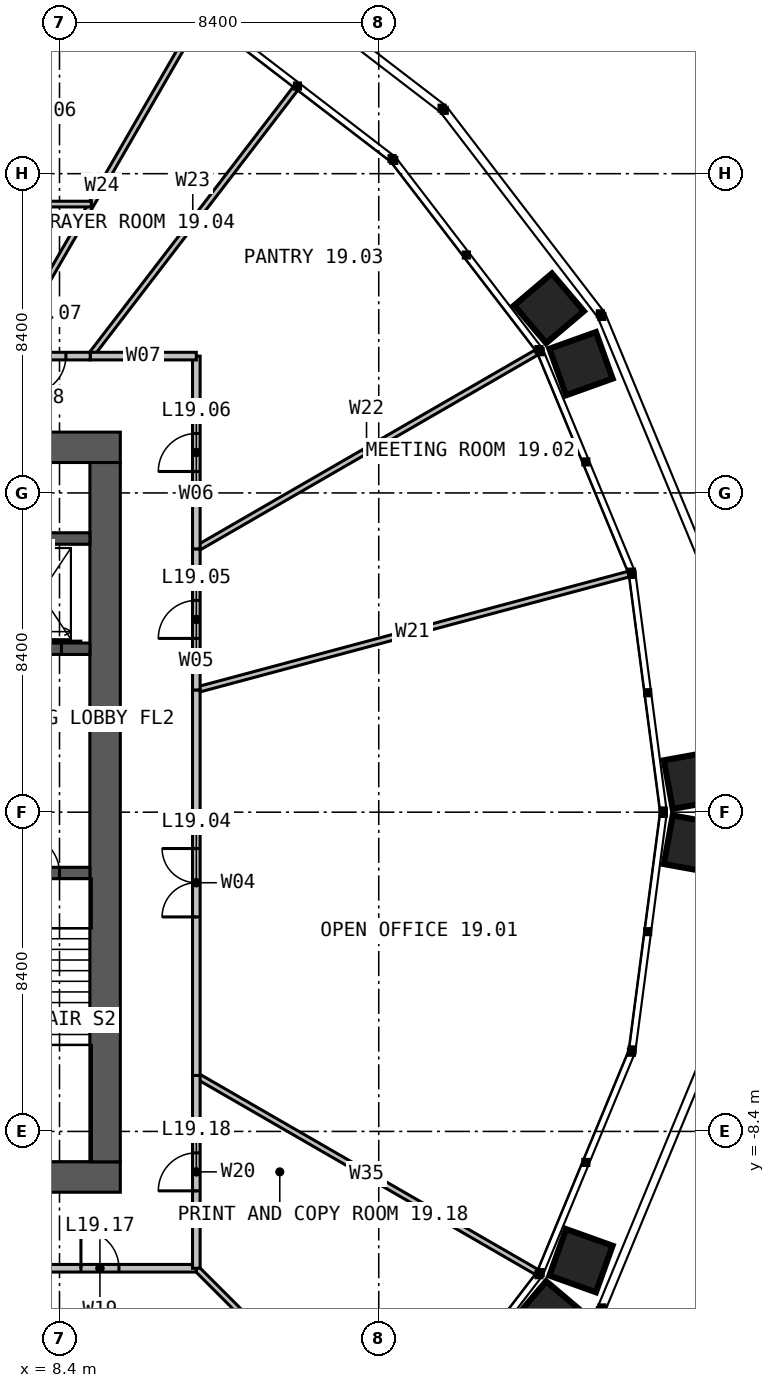
"""IFC4 building model, lengths in metres.
Left out: names, types, materials, properties, quantities, classifications, styles, units other than length and angle.
Written with IfcOpenShell. Run it as: python <this file> out.ifc"""

import sys

from ifc_helpers import new_model, si_unit, direction, frame, frame_2d, origin, place, context, subcontext, project, spatial, rectangle, extrude, element, fill, save


model = new_model("IFC4")
c1 = context("Model", 3, precision=1e-05, world=origin(), true_north=direction((0.0, 1.0)))
c2 = subcontext(c1, "Body", "Model", "MODEL_VIEW")
j1 = project(units=[si_unit("LENGTHUNIT", "METRE"), si_unit("PLANEANGLEUNIT", "RADIAN")], contexts=[c1])
p1 = place(None, origin())
s1 = spatial("IfcSite", under=j1, at=p1, CompositionType="ELEMENT")
p2 = place(p1, origin())
s2 = spatial("IfcBuilding", under=s1, at=p2, CompositionType="ELEMENT")
p3 = place(p2, frame((0.0, 0.0, 81.0)))
s3 = spatial("IfcBuildingStorey", under=s2, at=p3, CompositionType="ELEMENT", Elevation=81.0)
p4 = place(p3, frame((-10.0, 9.6, 0.0), z_axis=(0.0, 0.0, 1.0), x_axis=(1.0, 0.0, 0.0)))
e1 = element("IfcWall", 1, at=p4, inside=s3, PredefinedType="SOLIDWALL", context=c2, shape_type="SweptSolid", body=[
    extrude(rectangle(XDim=20.0, YDim=0.8, at=frame_2d((10.0, 0.0))), origin(), (0.0, 0.0, 1.0), 4.0),
])
p5 = place(p4, frame((9.4, 0.0, 0.0)))
e2 = element("IfcOpeningElement", 2, at=p5, cuts=e1, PredefinedType="OPENING", context=c2, shape_type="SweptSolid", body=[
    extrude(rectangle(XDim=1.2, YDim=2.2, at=frame_2d((0.6, 1.1))), frame((0.0, 0.41, 0.0), z_axis=(0.0, -1.0, 0.0), x_axis=(1.0, 0.0, 0.0)), (0.0, 0.0, 1.0), 0.82),
])
p6 = place(p3, frame((10.0, -9.6, 0.0), z_axis=(0.0, 0.0, 1.0), x_axis=(-1.0, 0.0, 0.0)))
e3 = element("IfcWall", 3, at=p6, inside=s3, PredefinedType="SOLIDWALL", context=c2, shape_type="SweptSolid", body=[
    extrude(rectangle(XDim=20.0, YDim=0.8, at=frame_2d((10.0, 0.0))), origin(), (0.0, 0.0, 1.0), 4.0),
])
p7 = place(p6, frame((6.875, 0.0, 0.0)))
e4 = element("IfcOpeningElement", 4, at=p7, cuts=e3, PredefinedType="OPENING", context=c2, shape_type="SweptSolid", body=[
    extrude(rectangle(XDim=1.2, YDim=2.2, at=frame_2d((0.6, 1.1))), frame((0.0, 0.41, 0.0), z_axis=(0.0, -1.0, 0.0), x_axis=(1.0, 0.0, 0.0)), (0.0, 0.0, 1.0), 0.82),
])
p8 = place(p3, frame((9.6, -9.2, 0.0), z_axis=(0.0, 0.0, 1.0), x_axis=(0.0, 1.0, 0.0)))
e5 = element("IfcWall", 5, at=p8, inside=s3, PredefinedType="SOLIDWALL", context=c2, shape_type="SweptSolid", body=[
    extrude(rectangle(XDim=18.4, YDim=0.8, at=frame_2d((9.2, 0.0))), origin(), (0.0, 0.0, 1.0), 4.0),
])
p9 = place(p3, frame((6.6, -1.6, 0.0), z_axis=(0.0, 0.0, 1.0), x_axis=(1.0, 0.0, 0.0)))
e6 = element("IfcWall", 6, at=p9, inside=s3, PredefinedType="SOLIDWALL", context=c2, shape_type="SweptSolid", body=[
    extrude(rectangle(XDim=2.6, YDim=0.3, at=frame_2d((1.3, 0.0))), origin(), (0.0, 0.0, 1.0), 4.0),
])
p10 = place(p9, frame((0.8, 0.0, 0.0)))
e7 = element("IfcOpeningElement", 7, at=p10, cuts=e6, PredefinedType="OPENING", context=c2, shape_type="SweptSolid", body=[
    extrude(rectangle(XDim=1.0, YDim=2.2, at=frame_2d((0.5, 1.1))), frame((0.0, 0.16, 0.0), z_axis=(0.0, -1.0, 0.0), x_axis=(1.0, 0.0, 0.0)), (0.0, 0.0, 1.0), 0.32),
])
p11 = place(p3, frame((6.6, 4.3, 0.0), z_axis=(0.0, 0.0, 1.0), x_axis=(1.0, 0.0, 0.0)))
e8 = element("IfcWall", 8, at=p11, inside=s3, PredefinedType="SOLIDWALL", context=c2, shape_type="SweptSolid", body=[
    extrude(rectangle(XDim=2.6, YDim=0.3, at=frame_2d((1.3, 0.0))), origin(), (0.0, 0.0, 1.0), 4.0),
])
p12 = place(p11, frame((0.75, 0.0, 0.0)))
e9 = element("IfcOpeningElement", 9, at=p12, cuts=e8, PredefinedType="OPENING", context=c2, shape_type="SweptSolid", body=[
    extrude(rectangle(XDim=1.1, YDim=2.2, at=frame_2d((0.55, 1.1))), frame((0.0, 0.16, 0.0), z_axis=(0.0, -1.0, 0.0), x_axis=(1.0, 0.0, 0.0)), (0.0, 0.0, 1.0), 0.32),
])
p13 = place(p3, frame((6.6, 7.2, 0.0), z_axis=(0.0, 0.0, 1.0), x_axis=(1.0, 0.0, 0.0)))
e10 = element("IfcWall", 10, at=p13, inside=s3, PredefinedType="SOLIDWALL", context=c2, shape_type="SweptSolid", body=[
    extrude(rectangle(XDim=2.6, YDim=0.3, at=frame_2d((1.3, 0.0))), origin(), (0.0, 0.0, 1.0), 4.0),
])
p14 = place(p3, frame((12.0, -6.928, 0.0), z_axis=(0.0, 0.0, 1.0), x_axis=(0.866023632182, -0.500003068493, 0.0)))
e11 = element("IfcWall", 11, at=p14, inside=s3, PredefinedType="PARTITIONING", context=c2, shape_type="SweptSolid", body=[
    extrude(rectangle(XDim=10.343, YDim=0.15, at=frame_2d((5.171, 0.0))), origin(), (0.0, 0.0, 1.0), 2.79),
])
p15 = place(p3, frame((12.0, 3.215, 0.0), z_axis=(0.0, 0.0, 1.0), x_axis=(0.965925934223, 0.258818642288, 0.0)))
e12 = element("IfcWall", 12, at=p15, inside=s3, PredefinedType="PARTITIONING", context=c2, shape_type="SweptSolid", body=[
    extrude(rectangle(XDim=11.776, YDim=0.15, at=frame_2d((5.888, 0.0))), origin(), (0.0, 0.0, 1.0), 2.79),
])
p16 = place(p3, frame((12.0, 6.928, 0.0), z_axis=(0.0, 0.0, 1.0), x_axis=(0.866023632182, 0.500003068493, 0.0)))
e13 = element("IfcWall", 13, at=p16, inside=s3, PredefinedType="PARTITIONING", context=c2, shape_type="SweptSolid", body=[
    extrude(rectangle(XDim=10.343, YDim=0.15, at=frame_2d((5.171, 0.0))), origin(), (0.0, 0.0, 1.0), 2.79),
])
p17 = place(p3, frame((9.208, 12.0, 0.0), z_axis=(0.0, 0.0, 1.0), x_axis=(0.608757526406, 0.793356334848, 0.0)))
e14 = element("IfcWall", 14, at=p17, inside=s3, PredefinedType="PARTITIONING", context=c2, shape_type="SweptSolid", body=[
    extrude(rectangle(XDim=8.866, YDim=0.15, at=frame_2d((4.433, 0.0))), origin(), (0.0, 0.0, 1.0), 2.79),
])
for number, where, z_axis, x_axis in (
    (15, (6.928, 12.0, 0.0), (0.0, 0.0, 1.0), (0.5, 0.866, 0.0)),
    (16, (6.928, -12.0, 0.0), (0.0, 0.0, 1.0), (0.5, -0.866, 0.0)),
):
    element("IfcWall", number, at=place(p3, frame(where, z_axis=z_axis, x_axis=x_axis)), inside=s3, PredefinedType="PARTITIONING", context=c2, shape_type="SweptSolid", body=[
        extrude(rectangle(XDim=10.343, YDim=0.15, at=frame_2d((5.171, 0.0))), origin(), (0.0, 0.0, 1.0), 2.79),
    ])
p18 = place(p3, frame((12.0, -12.0, 0.0), z_axis=(0.0, 0.0, 1.0), x_axis=(0.707106781187, -0.707106781187, 0.0)))
e17 = element("IfcWall", 17, at=p18, inside=s3, PredefinedType="PARTITIONING", context=c2, shape_type="SweptSolid", body=[
    extrude(rectangle(XDim=7.229, YDim=0.15, at=frame_2d((3.614, 0.0))), origin(), (0.0, 0.0, 1.0), 2.79),
])
p19 = place(p3, frame((12.0, -6.928, 0.0), z_axis=(0.0, 0.0, 1.0), x_axis=(0.0, 1.0, 0.0)))
e18 = element("IfcWall", 18, at=p19, inside=s3, PredefinedType="PARTITIONING", context=c2, shape_type="SweptSolid", body=[
    extrude(rectangle(XDim=10.144, YDim=0.2, at=frame_2d((5.072, 0.0))), origin(), (0.0, 0.0, 1.0), 3.8),
])
p20 = place(p19, frame((4.172, 0.0, 0.0)))
e19 = element("IfcOpeningElement", 19, at=p20, cuts=e18, PredefinedType="OPENING", context=c2, shape_type="SweptSolid", body=[
    extrude(rectangle(XDim=1.8, YDim=2.2, at=frame_2d((0.9, 1.1))), frame((0.0, 0.11, 0.0), z_axis=(0.0, -1.0, 0.0), x_axis=(1.0, 0.0, 0.0)), (0.0, 0.0, 1.0), 0.22),
])
p21 = place(p3, frame((12.0, 3.215, 0.0), z_axis=(0.0, 0.0, 1.0), x_axis=(0.0, 1.0, 0.0)))
e20 = element("IfcWall", 20, at=p21, inside=s3, PredefinedType="PARTITIONING", context=c2, shape_type="SweptSolid", body=[
    extrude(rectangle(XDim=3.713, YDim=0.2, at=frame_2d((1.856, 0.0))), origin(), (0.0, 0.0, 1.0), 3.8),
])
p22 = place(p21, frame((1.356, 0.0, 0.0)))
e21 = element("IfcOpeningElement", 21, at=p22, cuts=e20, PredefinedType="OPENING", context=c2, shape_type="SweptSolid", body=[
    extrude(rectangle(XDim=1.0, YDim=2.2, at=frame_2d((0.5, 1.1))), frame((0.0, 0.11, 0.0), z_axis=(0.0, -1.0, 0.0), x_axis=(1.0, 0.0, 0.0)), (0.0, 0.0, 1.0), 0.22),
])
p23 = place(p3, frame((12.0, 6.928, 0.0), z_axis=(0.0, 0.0, 1.0), x_axis=(0.0, 1.0, 0.0)))
e22 = element("IfcWall", 22, at=p23, inside=s3, PredefinedType="PARTITIONING", context=c2, shape_type="SweptSolid", body=[
    extrude(rectangle(XDim=5.072, YDim=0.2, at=frame_2d((2.536, 0.0))), origin(), (0.0, 0.0, 1.0), 3.8),
])
p24 = place(p23, frame((2.036, 0.0, 0.0)))
e23 = element("IfcOpeningElement", 23, at=p24, cuts=e22, PredefinedType="OPENING", context=c2, shape_type="SweptSolid", body=[
    extrude(rectangle(XDim=1.0, YDim=2.2, at=frame_2d((0.5, 1.1))), frame((0.0, 0.11, 0.0), z_axis=(0.0, -1.0, 0.0), x_axis=(1.0, 0.0, 0.0)), (0.0, 0.0, 1.0), 0.22),
])
p25 = place(p3, frame((12.0, 12.0, 0.0), z_axis=(0.0, 0.0, 1.0), x_axis=(-1.0, 0.0, 0.0)))
e24 = element("IfcWall", 24, at=p25, inside=s3, PredefinedType="PARTITIONING", context=c2, shape_type="SweptSolid", body=[
    extrude(rectangle(XDim=2.792, YDim=0.2, at=frame_2d((1.396, 0.0))), origin(), (0.0, 0.0, 1.0), 3.8),
])
p26 = place(p3, frame((9.208, 12.0, 0.0), z_axis=(0.0, 0.0, 1.0), x_axis=(-1.0, 0.0, 0.0)))
e25 = element("IfcWall", 25, at=p26, inside=s3, PredefinedType="PARTITIONING", context=c2, shape_type="SweptSolid", body=[
    extrude(rectangle(XDim=2.28, YDim=0.2, at=frame_2d((1.14, 0.0))), origin(), (0.0, 0.0, 1.0), 3.8),
])
p27 = place(p26, frame((0.64, 0.0, 0.0)))
e26 = element("IfcOpeningElement", 26, at=p27, cuts=e25, PredefinedType="OPENING", context=c2, shape_type="SweptSolid", body=[
    extrude(rectangle(XDim=1.0, YDim=2.2, at=frame_2d((0.5, 1.1))), frame((0.0, 0.11, 0.0), z_axis=(0.0, -1.0, 0.0), x_axis=(1.0, 0.0, 0.0)), (0.0, 0.0, 1.0), 0.22),
])
p28 = place(p3, frame((9.238, 16.0, 0.0), z_axis=(0.0, 0.0, 1.0), x_axis=(-1.0, 0.0, 0.0)))
e27 = element("IfcWall", 27, at=p28, inside=s3, PredefinedType="PARTITIONING", context=c2, shape_type="SweptSolid", body=[
    extrude(rectangle(XDim=18.475, YDim=0.15, at=frame_2d((9.238, 0.0))), origin(), (0.0, 0.0, 1.0), 2.79),
])
p29 = place(p28, frame((3.719, 0.0, 0.0)))
e28 = element("IfcOpeningElement", 28, at=p29, cuts=e27, PredefinedType="OPENING", context=c2, shape_type="SweptSolid", body=[
    extrude(rectangle(XDim=1.8, YDim=2.2, at=frame_2d((0.9, 1.1))), frame((0.0, 0.085, 0.0), z_axis=(0.0, -1.0, 0.0), x_axis=(1.0, 0.0, 0.0)), (0.0, 0.0, 1.0), 0.17),
])
p30 = place(p28, frame((9.791, 0.0, 0.0)))
e29 = element("IfcOpeningElement", 29, at=p30, cuts=e27, PredefinedType="OPENING", context=c2, shape_type="SweptSolid", body=[
    extrude(rectangle(XDim=1.0, YDim=2.2, at=frame_2d((0.5, 1.1))), frame((0.0, 0.085, 0.0), z_axis=(0.0, -1.0, 0.0), x_axis=(1.0, 0.0, 0.0)), (0.0, 0.0, 1.0), 0.17),
])
p31 = place(p28, frame((14.41, 0.0, 0.0)))
e30 = element("IfcOpeningElement", 30, at=p31, cuts=e27, PredefinedType="OPENING", context=c2, shape_type="SweptSolid", body=[
    extrude(rectangle(XDim=1.0, YDim=2.2, at=frame_2d((0.5, 1.1))), frame((0.0, 0.085, 0.0), z_axis=(0.0, -1.0, 0.0), x_axis=(1.0, 0.0, 0.0)), (0.0, 0.0, 1.0), 0.17),
])
p32 = place(p3, frame((6.928, -12.0, 0.0), z_axis=(0.0, 0.0, 1.0), x_axis=(1.0, 0.0, 0.0)))
e31 = element("IfcWall", 31, at=p32, inside=s3, PredefinedType="PARTITIONING", context=c2, shape_type="SweptSolid", body=[
    extrude(rectangle(XDim=5.072, YDim=0.2, at=frame_2d((2.536, 0.0))), origin(), (0.0, 0.0, 1.0), 3.8),
])
p33 = place(p32, frame((2.036, 0.0, 0.0)))
e32 = element("IfcOpeningElement", 32, at=p33, cuts=e31, PredefinedType="OPENING", context=c2, shape_type="SweptSolid", body=[
    extrude(rectangle(XDim=1.0, YDim=2.2, at=frame_2d((0.5, 1.1))), frame((0.0, 0.11, 0.0), z_axis=(0.0, -1.0, 0.0), x_axis=(1.0, 0.0, 0.0)), (0.0, 0.0, 1.0), 0.22),
])
p34 = place(p3, frame((12.0, -12.0, 0.0), z_axis=(0.0, 0.0, 1.0), x_axis=(0.0, 1.0, 0.0)))
e33 = element("IfcWall", 33, at=p34, inside=s3, PredefinedType="PARTITIONING", context=c2, shape_type="SweptSolid", body=[
    extrude(rectangle(XDim=5.072, YDim=0.2, at=frame_2d((2.536, 0.0))), origin(), (0.0, 0.0, 1.0), 3.8),
])
p35 = place(p34, frame((2.036, 0.0, 0.0)))
e34 = element("IfcOpeningElement", 34, at=p35, cuts=e33, PredefinedType="OPENING", context=c2, shape_type="SweptSolid", body=[
    extrude(rectangle(XDim=1.0, YDim=2.2, at=frame_2d((0.5, 1.1))), frame((0.0, 0.11, 0.0), z_axis=(0.0, -1.0, 0.0), x_axis=(1.0, 0.0, 0.0)), (0.0, 0.0, 1.0), 0.22),
])
p36 = place(p10, origin())
e35 = element("IfcDoor", 35, at=p36, inside=s3, OperationType="SINGLE_SWING_LEFT", PredefinedType="DOOR", context=c2, shape_type="SweptSolid", body=[
    extrude(rectangle(XDim=1.0, YDim=2.2, at=frame_2d((0.5, 1.1))), frame((0.0, 0.025, 0.0), z_axis=(0.0, -1.0, 0.0), x_axis=(1.0, 0.0, 0.0)), (0.0, 0.0, 1.0), 0.05),
])
fill(e7, e35)
p37 = place(p12, origin())
e36 = element("IfcDoor", 36, at=p37, inside=s3, OperationType="SLIDING_TO_LEFT", PredefinedType="DOOR", context=c2, shape_type="SweptSolid", body=[
    extrude(rectangle(XDim=1.1, YDim=2.2, at=frame_2d((0.55, 1.1))), frame((0.0, 0.025, 0.0), z_axis=(0.0, -1.0, 0.0), x_axis=(1.0, 0.0, 0.0)), (0.0, 0.0, 1.0), 0.05),
])
fill(e9, e36)
p38 = place(p20, origin())
e37 = element("IfcDoor", 37, at=p38, inside=s3, OperationType="DOUBLE_DOOR_SINGLE_SWING", PredefinedType="DOOR", context=c2, shape_type="SweptSolid", body=[
    extrude(rectangle(XDim=1.8, YDim=2.2, at=frame_2d((0.9, 1.1))), frame((0.0, 0.025, 0.0), z_axis=(0.0, -1.0, 0.0), x_axis=(1.0, 0.0, 0.0)), (0.0, 0.0, 1.0), 0.05),
])
fill(e19, e37)
p39 = place(p22, origin())
e38 = element("IfcDoor", 38, at=p39, inside=s3, OperationType="SINGLE_SWING_LEFT", PredefinedType="DOOR", context=c2, shape_type="SweptSolid", body=[
    extrude(rectangle(XDim=1.0, YDim=2.2, at=frame_2d((0.5, 1.1))), frame((0.0, 0.025, 0.0), z_axis=(0.0, -1.0, 0.0), x_axis=(1.0, 0.0, 0.0)), (0.0, 0.0, 1.0), 0.05),
])
fill(e21, e38)
p40 = place(p24, origin())
e39 = element("IfcDoor", 39, at=p40, inside=s3, OperationType="SINGLE_SWING_LEFT", PredefinedType="DOOR", context=c2, shape_type="SweptSolid", body=[
    extrude(rectangle(XDim=1.0, YDim=2.2, at=frame_2d((0.5, 1.1))), frame((0.0, 0.025, 0.0), z_axis=(0.0, -1.0, 0.0), x_axis=(1.0, 0.0, 0.0)), (0.0, 0.0, 1.0), 0.05),
])
fill(e23, e39)
p41 = place(p27, origin())
e40 = element("IfcDoor", 40, at=p41, inside=s3, OperationType="SINGLE_SWING_RIGHT", PredefinedType="DOOR", context=c2, shape_type="SweptSolid", body=[
    extrude(rectangle(XDim=1.0, YDim=2.2, at=frame_2d((0.5, 1.1))), frame((0.0, 0.025, 0.0), z_axis=(0.0, -1.0, 0.0), x_axis=(1.0, 0.0, 0.0)), (0.0, 0.0, 1.0), 0.05),
])
fill(e26, e40)
p42 = place(p33, origin())
e41 = element("IfcDoor", 41, at=p42, inside=s3, OperationType="SINGLE_SWING_LEFT", PredefinedType="DOOR", context=c2, shape_type="SweptSolid", body=[
    extrude(rectangle(XDim=1.0, YDim=2.2, at=frame_2d((0.5, 1.1))), frame((0.0, 0.025, 0.0), z_axis=(0.0, -1.0, 0.0), x_axis=(1.0, 0.0, 0.0)), (0.0, 0.0, 1.0), 0.05),
])
fill(e32, e41)
p43 = place(p35, origin())
e42 = element("IfcDoor", 42, at=p43, inside=s3, OperationType="SINGLE_SWING_LEFT", PredefinedType="DOOR", context=c2, shape_type="SweptSolid", body=[
    extrude(rectangle(XDim=1.0, YDim=2.2, at=frame_2d((0.5, 1.1))), frame((0.0, 0.025, 0.0), z_axis=(0.0, -1.0, 0.0), x_axis=(1.0, 0.0, 0.0)), (0.0, 0.0, 1.0), 0.05),
])
fill(e34, e42)
save(model, sys.argv[1])
